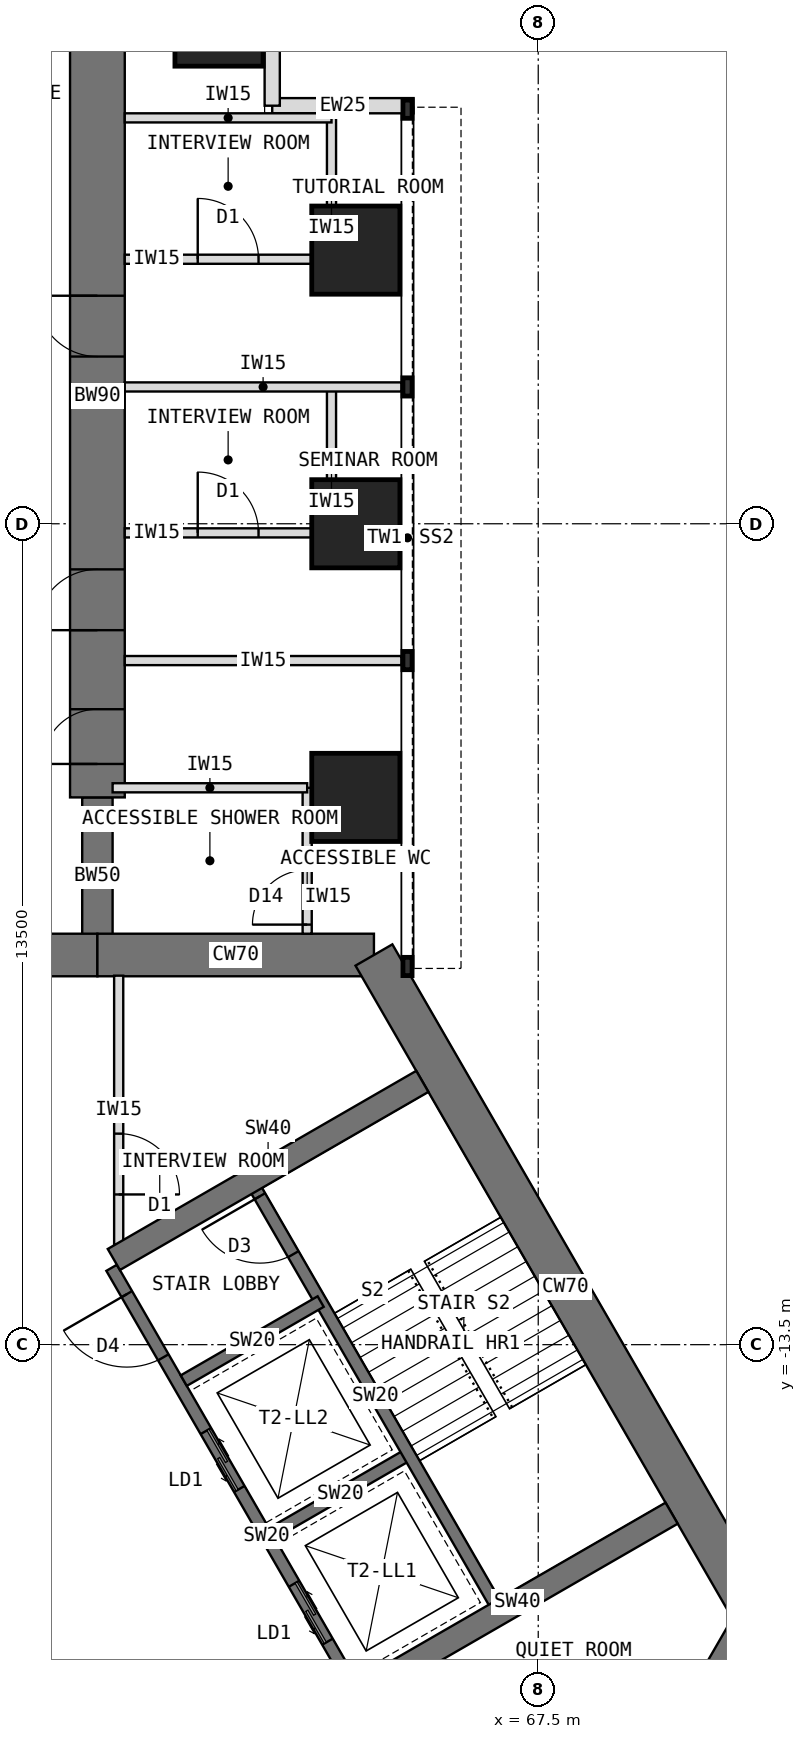
"""IFC4 building model, lengths in metres.
Left out: names, types, materials, properties, quantities, classifications, styles, units other than length and angle.
Written with IfcOpenShell. Run it as: python <this file> out.ifc"""

import sys

from ifc_helpers import new_model, si_unit, direction, frame, frame_2d, origin, origin_2d, place, context, subcontext, project, spatial, rectangle, extrude, element, fill, save


model = new_model("IFC4")
c1 = context("Model", 3, precision=1e-05, world=origin(), true_north=direction((0.0, 1.0)))
c2 = subcontext(c1, "Body", "Model", "MODEL_VIEW")
j1 = project(units=[si_unit("LENGTHUNIT", "METRE"), si_unit("PLANEANGLEUNIT", "RADIAN")], contexts=[c1])
p1 = place(None, origin())
s1 = spatial("IfcSite", under=j1, at=p1, CompositionType="ELEMENT")
p2 = place(p1, origin())
s2 = spatial("IfcBuilding", under=s1, at=p2, CompositionType="ELEMENT")
p3 = place(p2, frame((0.0, 0.0, 60.5)))
s3 = spatial("IfcBuildingStorey", under=s2, at=p3, CompositionType="ELEMENT", Elevation=60.5)
p4 = place(p3, frame((64.798, -7.092, 0.0), z_axis=(0.0, 0.0, 1.0), x_axis=(-1.0, 0.0, 0.0)))
e1 = element("IfcWall", 1, at=p4, inside=s3, PredefinedType="SHEAR", context=c2, shape_type="SweptSolid", body=[
    extrude(rectangle(XDim=4.548, YDim=0.7, at=frame_2d((2.274, 0.0))), origin(), (0.0, 0.0, 1.0), 4.0),
])
p5 = place(p3, frame((60.25, -7.092, 0.0), z_axis=(0.0, 0.0, 1.0), x_axis=(-1.0, 0.0, 0.0)))
e2 = element("IfcWall", 2, at=p5, inside=s3, PredefinedType="SHEAR", context=c2, shape_type="SweptSolid", body=[
    extrude(rectangle(XDim=3.5, YDim=0.7, at=frame_2d((1.75, 0.0))), origin(), (0.0, 0.0, 1.0), 4.0),
])
p6 = place(p5, frame((0.85, 0.0, 0.0)))
e3 = element("IfcOpeningElement", 3, at=p6, cuts=e2, PredefinedType="OPENING", context=c2, shape_type="SweptSolid", body=[
    extrude(rectangle(XDim=1.8, YDim=2.1, at=frame_2d((0.9, 1.05))), frame((0.0, 0.36, 0.0), z_axis=(0.0, -1.0, 0.0), x_axis=(1.0, 0.0, 0.0)), (0.0, 0.0, 1.0), 0.72),
])
p7 = place(p3, frame((68.822, -21.939, 0.0), z_axis=(0.0, 0.0, 1.0), x_axis=(0.500024481964, 0.866011268655, 0.0)))
e4 = element("IfcWall", 4, at=p7, inside=s3, PredefinedType="SHEAR", context=c2, shape_type="SweptSolid", body=[
    extrude(rectangle(XDim=4.548, YDim=0.7, at=frame_2d((2.274, 0.0))), origin(), (0.0, 0.0, 1.0), 4.0),
])
p8 = place(p3, frame((71.096, -18.0, 0.0), z_axis=(0.0, 0.0, 1.0), x_axis=(-0.500005998175, 0.866021940709, 0.0)))
e5 = element("IfcWall", 5, at=p8, inside=s3, PredefinedType="SHEAR", context=c2, shape_type="SweptSolid", body=[
    extrude(rectangle(XDim=12.596, YDim=0.7, at=frame_2d((6.298, 0.0))), origin(), (0.0, 0.0, 1.0), 4.0),
])
p9 = place(p3, frame((60.25, -7.092, 0.0), z_axis=(0.0, 0.0, 1.0), x_axis=(0.0, 1.0, 0.0)))
e6 = element("IfcWall", 6, at=p9, inside=s3, PredefinedType="SHEAR", context=c2, shape_type="SweptSolid", body=[
    extrude(rectangle(XDim=2.592, YDim=0.5, at=frame_2d((1.296, 0.0))), origin(), (0.0, 0.0, 1.0), 4.0),
])
p10 = place(p3, frame((60.25, -4.5, 0.0), z_axis=(0.0, 0.0, 1.0), x_axis=(0.0, 1.0, 0.0)))
e7 = element("IfcWall", 7, at=p10, inside=s3, PredefinedType="SHEAR", context=c2, shape_type="SweptSolid", body=[
    extrude(rectangle(XDim=13.2, YDim=0.9, at=frame_2d((6.6, 0.0))), origin(), (0.0, 0.0, 1.0), 4.0),
])
p11 = place(p10, frame((0.55, 0.0, 0.0)))
e8 = element("IfcOpeningElement", 8, at=p11, cuts=e7, PredefinedType="OPENING", context=c2, shape_type="SweptSolid", body=[
    extrude(rectangle(XDim=0.9, YDim=2.1, at=frame_2d((0.45, 1.05))), frame((0.0, 0.46, 0.0), z_axis=(0.0, -1.0, 0.0), x_axis=(1.0, 0.0, 0.0)), (0.0, 0.0, 1.0), 0.92),
])
p12 = place(p10, frame((2.75, 0.0, 0.0)))
e9 = element("IfcOpeningElement", 9, at=p12, cuts=e7, PredefinedType="OPENING", context=c2, shape_type="SweptSolid", body=[
    extrude(rectangle(XDim=1.0, YDim=2.1, at=frame_2d((0.5, 1.05))), frame((0.0, 0.46, 0.0), z_axis=(0.0, -1.0, 0.0), x_axis=(1.0, 0.0, 0.0)), (0.0, 0.0, 1.0), 0.92),
])
p13 = place(p10, frame((7.25, 0.0, 0.0)))
e10 = element("IfcOpeningElement", 10, at=p13, cuts=e7, PredefinedType="OPENING", context=c2, shape_type="SweptSolid", body=[
    extrude(rectangle(XDim=1.0, YDim=2.1, at=frame_2d((0.5, 1.05))), frame((0.0, 0.46, 0.0), z_axis=(0.0, -1.0, 0.0), x_axis=(1.0, 0.0, 0.0)), (0.0, 0.0, 1.0), 0.92),
])
for number, where, z_axis, x_axis in (
    (11, (64.5, -4.5, 0.0), (0.0, 0.0, 1.0), (1.0, 0.0, 0.0)),
    (12, (64.5, 0.0, 0.0), (0.0, 0.0, 1.0), (1.0, 0.0, 0.0)),
    (13, (64.5, 4.5, 0.0), (0.0, 0.0, 1.0), (1.0, 0.0, 0.0)),
    (14, (62.25, 8.25, 0.0), (0.0, 0.0, 1.0), (1.0, 0.0, 0.0)),
):
    element("IfcColumn", number, at=place(p3, frame(where, z_axis=z_axis, x_axis=x_axis)), inside=s3, PredefinedType="COLUMN", context=c2, shape_type="SweptSolid", body=[
        extrude(rectangle(XDim=1.45, YDim=1.45, at=origin_2d()), origin(), (0.0, 0.0, 1.0), 4.0),
    ])
for number, where, z_axis, x_axis in (
    (15, (65.45, 6.875, 0.0), (0.0, 0.0, 1.0), (-1.0, 0.0, 0.0)),
    (16, (63.125, 6.875, 0.0), (0.0, 0.0, 1.0), (0.0, 1.0, 0.0)),
):
    element("IfcWall", number, at=place(p3, frame(where, z_axis=z_axis, x_axis=x_axis)), inside=s3, PredefinedType="STANDARD", context=c2, shape_type="SweptSolid", body=[
        extrude(rectangle(XDim=2.325, YDim=0.25, at=frame_2d((1.163, 0.0))), origin(), (0.0, 0.0, 1.0), 3.8),
    ])
p14 = place(p3, frame((64.484, -19.164, 0.0), z_axis=(0.0, 0.0, 1.0), x_axis=(-0.49999894854, 0.866026010844, 0.0)))
e17 = element("IfcWall", 17, at=p14, inside=s3, PredefinedType="SHEAR", context=c2, shape_type="SweptSolid", body=[
    extrude(rectangle(XDim=8.0, YDim=0.2, at=frame_2d((4.0, 0.0))), origin(), (0.0, 0.0, 1.0), 4.0),
])
p15 = place(p14, frame((6.3, 0.0, 0.0)))
e18 = element("IfcOpeningElement", 18, at=p15, cuts=e17, PredefinedType="OPENING", context=c2, shape_type="SweptSolid", body=[
    extrude(rectangle(XDim=1.2, YDim=2.1, at=frame_2d((0.6, 1.05))), frame((0.0, 0.11, 0.0), z_axis=(0.0, -1.0, 0.0), x_axis=(1.0, 0.0, 0.0)), (0.0, 0.0, 1.0), 0.22),
])
p16 = place(p14, frame((0.9, 0.0, 0.0)))
e19 = element("IfcOpeningElement", 19, at=p16, cuts=e17, PredefinedType="OPENING", context=c2, shape_type="SweptSolid", body=[
    extrude(rectangle(XDim=1.1, YDim=2.2, at=frame_2d((0.55, 1.1))), frame((0.0, 0.11, 0.0), z_axis=(0.0, -1.0, 0.0), x_axis=(1.0, 0.0, 0.0)), (0.0, 0.0, 1.0), 0.22),
])
p17 = place(p14, frame((3.8, 0.0, 0.0)))
e20 = element("IfcOpeningElement", 20, at=p17, cuts=e17, PredefinedType="OPENING", context=c2, shape_type="SweptSolid", body=[
    extrude(rectangle(XDim=1.1, YDim=2.2, at=frame_2d((0.55, 1.1))), frame((0.0, 0.11, 0.0), z_axis=(0.0, -1.0, 0.0), x_axis=(1.0, 0.0, 0.0)), (0.0, 0.0, 1.0), 0.22),
])
p18 = place(p3, frame((63.12, -16.603, 0.0), z_axis=(0.0, 0.0, 1.0), x_axis=(0.866062058628, 0.499936506574, 0.0)))
e21 = element("IfcWall", 21, at=p18, inside=s3, PredefinedType="SHEAR", context=c2, shape_type="SweptSolid", body=[
    extrude(rectangle(XDim=2.6, YDim=0.2, at=frame_2d((1.3, 0.0))), origin(), (0.0, 0.0, 1.0), 4.0),
])
p19 = place(p3, frame((61.67, -14.091, 0.0), z_axis=(0.0, 0.0, 1.0), x_axis=(0.86603858612, 0.49997716683, 0.0)))
e22 = element("IfcWall", 22, at=p19, inside=s3, PredefinedType="SHEAR", context=c2, shape_type="SweptSolid", body=[
    extrude(rectangle(XDim=2.6, YDim=0.2, at=frame_2d((1.3, 0.0))), origin(), (0.0, 0.0, 1.0), 4.0),
])
p20 = place(p3, frame((66.822, -17.814, 0.0), z_axis=(0.0, 0.0, 1.0), x_axis=(-0.49999894854, 0.866026010844, 0.0)))
e23 = element("IfcWall", 23, at=p20, inside=s3, PredefinedType="SHEAR", context=c2, shape_type="SweptSolid", body=[
    extrude(rectangle(XDim=8.0, YDim=0.2, at=frame_2d((4.0, 0.0))), origin(), (0.0, 0.0, 1.0), 4.0),
])
p21 = place(p20, frame((6.7, 0.0, 0.0)))
e24 = element("IfcOpeningElement", 24, at=p21, cuts=e23, PredefinedType="OPENING", context=c2, shape_type="SweptSolid", body=[
    extrude(rectangle(XDim=1.1, YDim=2.1, at=frame_2d((0.55, 1.05))), frame((0.0, 0.11, 0.0), z_axis=(0.0, -1.0, 0.0), x_axis=(1.0, 0.0, 0.0)), (0.0, 0.0, 1.0), 0.22),
])
for number, where, z_axis, x_axis in (
    (25, (60.52, -12.099, 0.0), (0.0, 0.0, 1.0), (0.866, 0.5, 0.0)),
    (26, (64.62, -19.201, 0.0), (0.0, 0.0, 1.0), (0.866, 0.5, 0.0)),
):
    element("IfcWall", number, at=place(p3, frame(where, z_axis=z_axis, x_axis=x_axis)), inside=s3, PredefinedType="SHEAR", context=c2, shape_type="SweptSolid", body=[
        extrude(rectangle(XDim=5.858, YDim=0.4, at=frame_2d((2.929, 0.0))), origin(), (0.0, 0.0, 1.0), 4.0),
    ])
for number, where, z_axis, x_axis in (
    (27, (60.7, -2.25, 0.0), (0.0, 0.0, 1.0), (1.0, 0.0, 0.0)),
    (28, (60.7, 2.25, 0.0), (0.0, 0.0, 1.0), (1.0, 0.0, 0.0)),
):
    element("IfcWall", number, at=place(p3, frame(where, z_axis=z_axis, x_axis=x_axis)), inside=s3, PredefinedType="PARTITIONING", context=c2, shape_type="SweptSolid", body=[
        extrude(rectangle(XDim=4.55, YDim=0.15, at=frame_2d((2.275, 0.0))), origin(), (0.0, 0.0, 1.0), 3.8),
    ])
p22 = place(p3, frame((64.1, -0.15, 0.0), z_axis=(0.0, 0.0, 1.0), x_axis=(0.0, 1.0, 0.0)))
e29 = element("IfcWall", 29, at=p22, inside=s3, PredefinedType="PARTITIONING", context=c2, shape_type="SweptSolid", body=[
    extrude(rectangle(XDim=2.4, YDim=0.15, at=frame_2d((1.2, 0.0))), origin(), (0.0, 0.0, 1.0), 3.8),
])
p23 = place(p3, frame((60.7, -0.15, 0.0), z_axis=(0.0, 0.0, 1.0), x_axis=(1.0, 0.0, 0.0)))
e30 = element("IfcWall", 30, at=p23, inside=s3, PredefinedType="PARTITIONING", context=c2, shape_type="SweptSolid", body=[
    extrude(rectangle(XDim=3.4, YDim=0.15, at=frame_2d((1.7, 0.0))), origin(), (0.0, 0.0, 1.0), 3.8),
])
p24 = place(p23, frame((1.2, 0.0, 0.0)))
e31 = element("IfcOpeningElement", 31, at=p24, cuts=e30, PredefinedType="OPENING", context=c2, shape_type="SweptSolid", body=[
    extrude(rectangle(XDim=1.0, YDim=2.1, at=frame_2d((0.5, 1.05))), frame((0.0, 0.085, 0.0), z_axis=(0.0, -1.0, 0.0), x_axis=(1.0, 0.0, 0.0)), (0.0, 0.0, 1.0), 0.17),
])
p25 = place(p3, frame((64.1, 4.35, 0.0), z_axis=(0.0, 0.0, 1.0), x_axis=(0.0, 1.0, 0.0)))
e32 = element("IfcWall", 32, at=p25, inside=s3, PredefinedType="PARTITIONING", context=c2, shape_type="SweptSolid", body=[
    extrude(rectangle(XDim=2.4, YDim=0.15, at=frame_2d((1.2, 0.0))), origin(), (0.0, 0.0, 1.0), 3.8),
])
p26 = place(p3, frame((60.7, 4.35, 0.0), z_axis=(0.0, 0.0, 1.0), x_axis=(1.0, 0.0, 0.0)))
e33 = element("IfcWall", 33, at=p26, inside=s3, PredefinedType="PARTITIONING", context=c2, shape_type="SweptSolid", body=[
    extrude(rectangle(XDim=3.4, YDim=0.15, at=frame_2d((1.7, 0.0))), origin(), (0.0, 0.0, 1.0), 3.8),
])
p27 = place(p26, frame((1.2, 0.0, 0.0)))
e34 = element("IfcOpeningElement", 34, at=p27, cuts=e33, PredefinedType="OPENING", context=c2, shape_type="SweptSolid", body=[
    extrude(rectangle(XDim=1.0, YDim=2.1, at=frame_2d((0.5, 1.05))), frame((0.0, 0.085, 0.0), z_axis=(0.0, -1.0, 0.0), x_axis=(1.0, 0.0, 0.0)), (0.0, 0.0, 1.0), 0.17),
])
p28 = place(p3, frame((60.7, 6.675, 0.0), z_axis=(0.0, 0.0, 1.0), x_axis=(1.0, 0.0, 0.0)))
e35 = element("IfcWall", 35, at=p28, inside=s3, PredefinedType="PARTITIONING", context=c2, shape_type="SweptSolid", body=[
    extrude(rectangle(XDim=3.4, YDim=0.15, at=frame_2d((1.7, 0.0))), origin(), (0.0, 0.0, 1.0), 3.8),
])
p29 = place(p3, frame((63.7, -6.742, 0.0), z_axis=(0.0, 0.0, 1.0), x_axis=(0.0, 1.0, 0.0)))
e36 = element("IfcWall", 36, at=p29, inside=s3, PredefinedType="PARTITIONING", context=c2, shape_type="SweptSolid", body=[
    extrude(rectangle(XDim=2.4, YDim=0.15, at=frame_2d((1.2, 0.0))), origin(), (0.0, 0.0, 1.0), 3.8),
])
p30 = place(p29, frame((0.15, 0.0, 0.0)))
e37 = element("IfcOpeningElement", 37, at=p30, cuts=e36, PredefinedType="OPENING", context=c2, shape_type="SweptSolid", body=[
    extrude(rectangle(XDim=0.9, YDim=2.1, at=frame_2d((0.45, 1.05))), frame((0.0, 0.085, 0.0), z_axis=(0.0, -1.0, 0.0), x_axis=(1.0, 0.0, 0.0)), (0.0, 0.0, 1.0), 0.17),
])
p31 = place(p3, frame((60.5, -4.342, 0.0), z_axis=(0.0, 0.0, 1.0), x_axis=(1.0, 0.0, 0.0)))
e38 = element("IfcWall", 38, at=p31, inside=s3, PredefinedType="PARTITIONING", context=c2, shape_type="SweptSolid", body=[
    extrude(rectangle(XDim=3.2, YDim=0.15, at=frame_2d((1.6, 0.0))), origin(), (0.0, 0.0, 1.0), 3.8),
])
p32 = place(p3, frame((60.6, -7.432, 0.0), z_axis=(0.0, 0.0, 1.0), x_axis=(0.0, -1.0, 0.0)))
e39 = element("IfcWall", 39, at=p32, inside=s3, PredefinedType="PARTITIONING", context=c2, shape_type="SweptSolid", body=[
    extrude(rectangle(XDim=4.426, YDim=0.15, at=frame_2d((2.213, 0.0))), origin(), (0.0, 0.0, 1.0), 3.8),
])
p33 = place(p32, frame((2.598, 0.0, 0.0)))
e40 = element("IfcOpeningElement", 40, at=p33, cuts=e39, PredefinedType="OPENING", context=c2, shape_type="SweptSolid", body=[
    extrude(rectangle(XDim=1.0, YDim=2.1, at=frame_2d((0.5, 1.05))), frame((0.0, 0.085, 0.0), z_axis=(0.0, -1.0, 0.0), x_axis=(1.0, 0.0, 0.0)), (0.0, 0.0, 1.0), 0.17),
])
p34 = place(p15, origin())
e41 = element("IfcDoor", 41, at=p34, inside=s3, OperationType="SINGLE_SWING_RIGHT", PredefinedType="DOOR", context=c2, shape_type="SweptSolid", body=[
    extrude(rectangle(XDim=1.2, YDim=2.1, at=frame_2d((0.6, 1.05))), frame((0.0, 0.025, 0.0), z_axis=(0.0, -1.0, 0.0), x_axis=(1.0, 0.0, 0.0)), (0.0, 0.0, 1.0), 0.05),
])
fill(e18, e41)
p35 = place(p16, origin())
e42 = element("IfcDoor", 42, at=p35, inside=s3, OperationType="DOUBLE_DOOR_SLIDING", PredefinedType="DOOR", context=c2, shape_type="SweptSolid", body=[
    extrude(rectangle(XDim=1.1, YDim=2.2, at=frame_2d((0.55, 1.1))), frame((0.0, 0.025, 0.0), z_axis=(0.0, -1.0, 0.0), x_axis=(1.0, 0.0, 0.0)), (0.0, 0.0, 1.0), 0.05),
])
fill(e19, e42)
p36 = place(p17, origin())
e43 = element("IfcDoor", 43, at=p36, inside=s3, OperationType="DOUBLE_DOOR_SLIDING", PredefinedType="DOOR", context=c2, shape_type="SweptSolid", body=[
    extrude(rectangle(XDim=1.1, YDim=2.2, at=frame_2d((0.55, 1.1))), frame((0.0, 0.025, 0.0), z_axis=(0.0, -1.0, 0.0), x_axis=(1.0, 0.0, 0.0)), (0.0, 0.0, 1.0), 0.05),
])
fill(e20, e43)
p37 = place(p21, origin())
e44 = element("IfcDoor", 44, at=p37, inside=s3, OperationType="SINGLE_SWING_RIGHT", PredefinedType="DOOR", context=c2, shape_type="SweptSolid", body=[
    extrude(rectangle(XDim=1.1, YDim=2.1, at=frame_2d((0.55, 1.05))), frame((0.0, 0.025, 0.0), z_axis=(0.0, -1.0, 0.0), x_axis=(1.0, 0.0, 0.0)), (0.0, 0.0, 1.0), 0.05),
])
fill(e24, e44)
p38 = place(p24, origin())
e45 = element("IfcDoor", 45, at=p38, inside=s3, OperationType="SINGLE_SWING_LEFT", PredefinedType="DOOR", context=c2, shape_type="SweptSolid", body=[
    extrude(rectangle(XDim=1.0, YDim=2.1, at=frame_2d((0.5, 1.05))), frame((0.0, 0.025, 0.0), z_axis=(0.0, -1.0, 0.0), x_axis=(1.0, 0.0, 0.0)), (0.0, 0.0, 1.0), 0.05),
])
fill(e31, e45)
p39 = place(p27, origin())
e46 = element("IfcDoor", 46, at=p39, inside=s3, OperationType="SINGLE_SWING_LEFT", PredefinedType="DOOR", context=c2, shape_type="SweptSolid", body=[
    extrude(rectangle(XDim=1.0, YDim=2.1, at=frame_2d((0.5, 1.05))), frame((0.0, 0.025, 0.0), z_axis=(0.0, -1.0, 0.0), x_axis=(1.0, 0.0, 0.0)), (0.0, 0.0, 1.0), 0.05),
])
fill(e34, e46)
p40 = place(p30, origin())
e47 = element("IfcDoor", 47, at=p40, inside=s3, OperationType="SINGLE_SWING_LEFT", PredefinedType="DOOR", context=c2, shape_type="SweptSolid", body=[
    extrude(rectangle(XDim=0.9, YDim=2.1, at=frame_2d((0.45, 1.05))), frame((0.0, 0.025, 0.0), z_axis=(0.0, -1.0, 0.0), x_axis=(1.0, 0.0, 0.0)), (0.0, 0.0, 1.0), 0.05),
])
fill(e37, e47)
p41 = place(p33, origin())
e48 = element("IfcDoor", 48, at=p41, inside=s3, OperationType="SINGLE_SWING_RIGHT", PredefinedType="DOOR", context=c2, shape_type="SweptSolid", body=[
    extrude(rectangle(XDim=1.0, YDim=2.1, at=frame_2d((0.5, 1.05))), frame((0.0, 0.025, 0.0), z_axis=(0.0, -1.0, 0.0), x_axis=(1.0, 0.0, 0.0)), (0.0, 0.0, 1.0), 0.05),
])
fill(e40, e48)
p42 = place(p11, origin())
e49 = element("IfcDoor", 49, at=p42, inside=s3, OperationType="SINGLE_SWING_LEFT", PredefinedType="DOOR", context=c2, shape_type="SweptSolid", body=[
    extrude(rectangle(XDim=0.82, YDim=2.06, at=frame_2d((0.45, 1.03))), frame((0.0, 0.025, 0.0), z_axis=(0.0, -1.0, 0.0), x_axis=(1.0, 0.0, 0.0)), (0.0, 0.0, 1.0), 0.05),
    extrude(rectangle(XDim=0.04, YDim=2.1, at=frame_2d((0.02, 1.05))), frame((0.0, 0.45, 0.0), z_axis=(0.0, -1.0, 0.0), x_axis=(1.0, 0.0, 0.0)), (0.0, 0.0, 1.0), 0.899),
    extrude(rectangle(XDim=0.04, YDim=2.1, at=frame_2d((0.88, 1.05))), frame((0.0, 0.45, 0.0), z_axis=(0.0, -1.0, 0.0), x_axis=(1.0, 0.0, 0.0)), (0.0, 0.0, 1.0), 0.899),
    extrude(rectangle(XDim=0.82, YDim=0.04, at=frame_2d((0.45, 2.08))), frame((0.0, 0.45, 0.0), z_axis=(0.0, -1.0, 0.0), x_axis=(1.0, 0.0, 0.0)), (0.0, 0.0, 1.0), 0.899),
])
fill(e8, e49)
p43 = place(p12, origin())
e50 = element("IfcDoor", 50, at=p43, inside=s3, OperationType="SINGLE_SWING_LEFT", PredefinedType="DOOR", context=c2, shape_type="SweptSolid", body=[
    extrude(rectangle(XDim=0.92, YDim=2.06, at=frame_2d((0.5, 1.03))), frame((0.0, 0.025, 0.0), z_axis=(0.0, -1.0, 0.0), x_axis=(1.0, 0.0, 0.0)), (0.0, 0.0, 1.0), 0.05),
    extrude(rectangle(XDim=0.04, YDim=2.1, at=frame_2d((0.02, 1.05))), frame((0.0, 0.45, 0.0), z_axis=(0.0, -1.0, 0.0), x_axis=(1.0, 0.0, 0.0)), (0.0, 0.0, 1.0), 0.899),
    extrude(rectangle(XDim=0.04, YDim=2.1, at=frame_2d((0.98, 1.05))), frame((0.0, 0.45, 0.0), z_axis=(0.0, -1.0, 0.0), x_axis=(1.0, 0.0, 0.0)), (0.0, 0.0, 1.0), 0.899),
    extrude(rectangle(XDim=0.92, YDim=0.04, at=frame_2d((0.5, 2.08))), frame((0.0, 0.45, 0.0), z_axis=(0.0, -1.0, 0.0), x_axis=(1.0, 0.0, 0.0)), (0.0, 0.0, 1.0), 0.899),
])
fill(e9, e50)
p44 = place(p13, origin())
e51 = element("IfcDoor", 51, at=p44, inside=s3, OperationType="SINGLE_SWING_RIGHT", PredefinedType="DOOR", context=c2, shape_type="SweptSolid", body=[
    extrude(rectangle(XDim=0.92, YDim=2.06, at=frame_2d((0.5, 1.03))), frame((0.0, 0.025, 0.0), z_axis=(0.0, -1.0, 0.0), x_axis=(1.0, 0.0, 0.0)), (0.0, 0.0, 1.0), 0.05),
    extrude(rectangle(XDim=0.04, YDim=2.1, at=frame_2d((0.02, 1.05))), frame((0.0, 0.45, 0.0), z_axis=(0.0, -1.0, 0.0), x_axis=(1.0, 0.0, 0.0)), (0.0, 0.0, 1.0), 0.899),
    extrude(rectangle(XDim=0.04, YDim=2.1, at=frame_2d((0.98, 1.05))), frame((0.0, 0.45, 0.0), z_axis=(0.0, -1.0, 0.0), x_axis=(1.0, 0.0, 0.0)), (0.0, 0.0, 1.0), 0.899),
    extrude(rectangle(XDim=0.92, YDim=0.04, at=frame_2d((0.5, 2.08))), frame((0.0, 0.45, 0.0), z_axis=(0.0, -1.0, 0.0), x_axis=(1.0, 0.0, 0.0)), (0.0, 0.0, 1.0), 0.899),
])
fill(e10, e51)
save(model, sys.argv[1])
